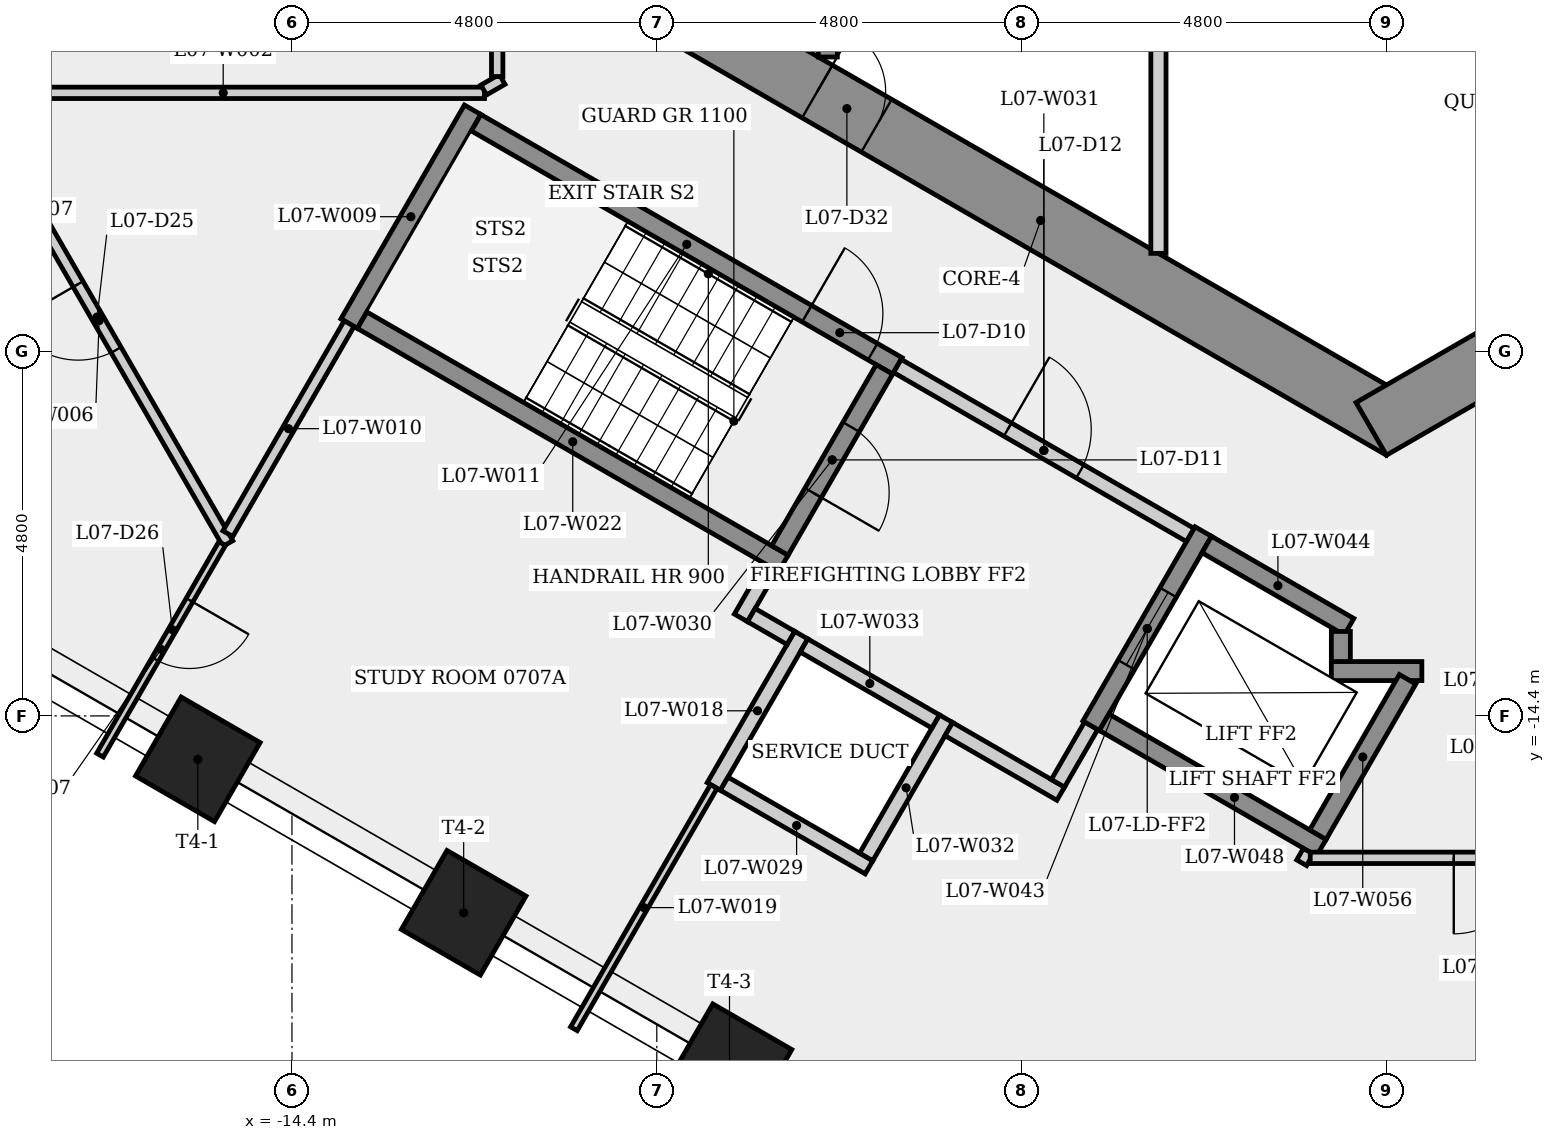
"""IFC4 building model, lengths in metres.
Left out: names, types, materials, properties, quantities, classifications, styles, units other than length and angle.
Written with IfcOpenShell. Run it as: python <this file> out.ifc"""

import sys

from ifc_helpers import new_model, si_unit, direction, frame, frame_2d, origin, origin_2d, place, context, subcontext, project, spatial, rectangle, extrude, element, fill, save


model = new_model("IFC4")
c1 = context("Model", 3, precision=1e-05, world=origin(), true_north=direction((0.0, 1.0)))
c2 = subcontext(c1, "Body", "Model", "MODEL_VIEW")
j1 = project(units=[si_unit("LENGTHUNIT", "METRE"), si_unit("PLANEANGLEUNIT", "RADIAN")], contexts=[c1])
p1 = place(None, origin())
s1 = spatial("IfcSite", under=j1, at=p1, CompositionType="ELEMENT")
p2 = place(p1, origin())
s2 = spatial("IfcBuilding", under=s1, at=p2, CompositionType="ELEMENT")
p3 = place(p2, frame((0.0, 0.0, 32.3)))
s3 = spatial("IfcBuildingStorey", under=s2, at=p3, CompositionType="ELEMENT", Elevation=32.3)
p4 = place(p3, frame((-9.3, -5.138, 0.0), z_axis=(0.0, 0.0, 1.0), x_axis=(0.866023993627, -0.500002442456, 0.0)))
e1 = element("IfcWall", 1, at=p4, inside=s3, PredefinedType="SHEAR", context=c2, shape_type="SweptSolid", body=[
    extrude(rectangle(XDim=10.97, YDim=0.8, at=frame_2d((5.485, 0.0))), origin(), (0.0, 0.0, 1.0), 3.4),
])
p5 = place(p4, frame((2.091, 0.0, 0.0)))
e2 = element("IfcOpeningElement", 2, at=p5, cuts=e1, PredefinedType="OPENING", context=c2, shape_type="SweptSolid", body=[
    extrude(rectangle(XDim=0.9, YDim=2.1, at=frame_2d((0.45, 1.05))), frame((0.0, 0.41, 0.0), z_axis=(0.0, -1.0, 0.0), x_axis=(1.0, 0.0, 0.0)), (0.0, 0.0, 1.0), 0.82),
])
p6 = place(p3, frame((-0.2, -10.623, 0.0), z_axis=(0.0, 0.0, 1.0), x_axis=(0.866023993627, 0.500002442456, 0.0)))
e3 = element("IfcWall", 3, at=p6, inside=s3, PredefinedType="SHEAR", context=c2, shape_type="SweptSolid", body=[
    extrude(rectangle(XDim=10.97, YDim=0.8, at=frame_2d((5.485, 0.0))), origin(), (0.0, 0.0, 1.0), 3.4),
])
p7 = place(p6, frame((4.914, 0.0, 0.0)))
e4 = element("IfcOpeningElement", 4, at=p7, cuts=e3, PredefinedType="OPENING", context=c2, shape_type="SweptSolid", body=[
    extrude(rectangle(XDim=0.9, YDim=2.1, at=frame_2d((0.45, 1.05))), frame((0.0, 0.41, 0.0), z_axis=(0.0, -1.0, 0.0), x_axis=(1.0, 0.0, 0.0)), (0.0, 0.0, 1.0), 0.82),
])
for number, where, z_axis, x_axis in (
    (5, (-15.639, -14.971, 0.0), (0.0, 0.0, 1.0), (-0.5, -0.866, 0.0)),
    (6, (-12.141, -16.99, 0.0), (0.0, 0.0, 1.0), (-0.5, -0.866, 0.0)),
    (7, (-8.644, -19.01, 0.0), (0.0, 0.0, 1.0), (-0.5, -0.866, 0.0)),
):
    element("IfcColumn", number, at=place(p3, frame(where, z_axis=z_axis, x_axis=x_axis)), inside=s3, PredefinedType="COLUMN", context=c2, shape_type="SweptSolid", body=[
        extrude(rectangle(XDim=1.2, YDim=1.2, at=origin_2d()), origin(), (0.0, 0.0, 1.0), 3.4),
    ])
p8 = place(p3, frame((-18.742, -6.202, 0.0), z_axis=(0.0, 0.0, 1.0), x_axis=(1.0, 0.0, 0.0)))
e8 = element("IfcWall", 8, at=p8, inside=s3, PredefinedType="PARTITIONING", context=c2, shape_type="SweptSolid", body=[
    extrude(rectangle(XDim=6.875, YDim=0.15, at=frame_2d((3.438, 0.0))), origin(), (0.0, 0.0, 1.0), 3.05),
])
p9 = place(p3, frame((-15.243, -12.132, 0.0), z_axis=(0.0, 0.0, 1.0), x_axis=(-0.500004319728, 0.866022909774, 0.0)))
e9 = element("IfcWall", 9, at=p9, inside=s3, PredefinedType="PARTITIONING", context=c2, shape_type="SweptSolid", body=[
    extrude(rectangle(XDim=6.773, YDim=0.15, at=frame_2d((3.386, 0.0))), origin(), (0.0, 0.0, 1.0), 3.05),
])
p10 = place(p9, frame((2.941, 0.0, 0.0)))
e10 = element("IfcOpeningElement", 10, at=p10, cuts=e9, PredefinedType="OPENING", context=c2, shape_type="SweptSolid", body=[
    extrude(rectangle(XDim=1.0, YDim=2.1, at=frame_2d((0.5, 1.05))), frame((0.0, 0.085, 0.0), z_axis=(0.0, -1.0, 0.0), x_axis=(1.0, 0.0, 0.0)), (0.0, 0.0, 1.0), 0.17),
])
p11 = place(p3, frame((-15.318, -12.132, 0.0), z_axis=(0.0, 0.0, 1.0), x_axis=(-0.500027048631, -0.866009786687, 0.0)))
e11 = element("IfcWall", 11, at=p11, inside=s3, PredefinedType="PARTITIONING", context=c2, shape_type="SweptSolid", body=[
    extrude(rectangle(XDim=3.215, YDim=0.1, at=frame_2d((1.607, 0.0))), origin(), (0.0, 0.0, 1.0), 3.05),
])
p12 = place(p11, frame((0.859, 0.0, 0.0)))
e12 = element("IfcOpeningElement", 12, at=p12, cuts=e11, PredefinedType="OPENING", context=c2, shape_type="SweptSolid", body=[
    extrude(rectangle(XDim=0.9, YDim=2.1, at=frame_2d((0.45, 1.05))), frame((0.0, 0.06, 0.0), z_axis=(0.0, -1.0, 0.0), x_axis=(1.0, 0.0, 0.0)), (0.0, 0.0, 1.0), 0.12),
])
p13 = place(p3, frame((-13.648, -9.239, 0.0), z_axis=(0.0, 0.0, 1.0), x_axis=(0.500017246033, 0.866015446554, 0.0)))
e13 = element("IfcWall", 13, at=p13, inside=s3, PredefinedType="SHEAR", context=c2, shape_type="SweptSolid", body=[
    extrude(rectangle(XDim=3.25, YDim=0.25, at=frame_2d((1.625, 0.0))), origin(), (0.0, 0.0, 1.0), 3.05),
])
p14 = place(p3, frame((-13.648, -9.239, 0.0), z_axis=(0.0, 0.0, 1.0), x_axis=(-0.50002266109, -0.866012320003, 0.0)))
e14 = element("IfcWall", 14, at=p14, inside=s3, PredefinedType="PARTITIONING", context=c2, shape_type="SweptSolid", body=[
    extrude(rectangle(XDim=3.191, YDim=0.15, at=frame_2d((1.596, 0.0))), origin(), (0.0, 0.0, 1.0), 3.05),
])
p15 = place(p3, frame((-11.977, -6.595, 0.0), z_axis=(0.0, 0.0, 1.0), x_axis=(0.866025499775, -0.499999833739, 0.0)))
e15 = element("IfcWall", 15, at=p15, inside=s3, PredefinedType="SHEAR", context=c2, shape_type="SweptSolid", body=[
    extrude(rectangle(XDim=6.4, YDim=0.25, at=frame_2d((3.2, 0.0))), origin(), (0.0, 0.0, 1.0), 3.05),
])
p16 = place(p15, frame((5.025, 0.0, 0.0)))
e16 = element("IfcOpeningElement", 16, at=p16, cuts=e15, PredefinedType="OPENING", context=c2, shape_type="SweptSolid", body=[
    extrude(rectangle(XDim=1.0, YDim=2.1, at=frame_2d((0.5, 1.05))), frame((0.0, 0.135, 0.0), z_axis=(0.0, -1.0, 0.0), x_axis=(1.0, 0.0, 0.0)), (0.0, 0.0, 1.0), 0.27),
])
p17 = place(p3, frame((-11.877, -6.164, 0.0), z_axis=(0.0, 0.0, 1.0), x_axis=(0.866083720475, 0.499898978922, 0.0)))
e17 = element("IfcWall", 17, at=p17, inside=s3, PredefinedType="PARTITIONING", context=c2, shape_type="SweptSolid", body=[
    extrude(rectangle(XDim=0.279, YDim=0.15, at=frame_2d((0.14, 0.0))), origin(), (0.0, 0.0, 1.0), 3.05),
])
p18 = place(p3, frame((-11.7, -5.987, 0.0), z_axis=(0.0, 0.0, 1.0), x_axis=(0.0, 1.0, 0.0)))
e18 = element("IfcWall", 18, at=p18, inside=s3, PredefinedType="PARTITIONING", context=c2, shape_type="SweptSolid", body=[
    extrude(rectangle(XDim=11.975, YDim=0.15, at=frame_2d((5.987, 0.0))), origin(), (0.0, 0.0, 1.0), 3.05),
])
p19 = place(p18, frame((5.487, 0.0, 0.0)))
e19 = element("IfcOpeningElement", 19, at=p19, cuts=e18, PredefinedType="OPENING", context=c2, shape_type="SweptSolid", body=[
    extrude(rectangle(XDim=1.0, YDim=2.1, at=frame_2d((0.5, 1.05))), frame((0.0, 0.085, 0.0), z_axis=(0.0, -1.0, 0.0), x_axis=(1.0, 0.0, 0.0)), (0.0, 0.0, 1.0), 0.17),
])
p20 = place(p3, frame((-8.85, -15.329, 0.0), z_axis=(0.0, 0.0, 1.0), x_axis=(0.500077740698, 0.865980515519, 0.0)))
e20 = element("IfcWall", 20, at=p20, inside=s3, PredefinedType="PLUMBINGWALL", context=c2, shape_type="SweptSolid", body=[
    extrude(rectangle(XDim=2.3, YDim=0.2, at=frame_2d((1.15, 0.0))), origin(), (0.0, 0.0, 1.0), 3.05),
])
p21 = place(p3, frame((-8.85, -15.329, 0.0), z_axis=(0.0, 0.0, 1.0), x_axis=(-0.499955964762, -0.866050826049, 0.0)))
e21 = element("IfcWall", 21, at=p21, inside=s3, PredefinedType="PARTITIONING", context=c2, shape_type="SweptSolid", body=[
    extrude(rectangle(XDim=3.68, YDim=0.1, at=frame_2d((1.84, 0.0))), origin(), (0.0, 0.0, 1.0), 3.05),
])
p22 = place(p3, frame((-8.493, -13.11, 0.0), z_axis=(0.0, 0.0, 1.0), x_axis=(0.500067724834, 0.865986299303, 0.0)))
e22 = element("IfcWall", 22, at=p22, inside=s3, PredefinedType="PARTITIONING", context=c2, shape_type="SweptSolid", body=[
    extrude(rectangle(XDim=0.775, YDim=0.2, at=frame_2d((0.388, 0.0))), origin(), (0.0, 0.0, 1.0), 3.05),
])
p23 = place(p3, frame((-7.935, -12.393, 0.0), z_axis=(0.0, 0.0, 1.0), x_axis=(-0.866025499775, 0.499999833739, 0.0)))
e23 = element("IfcWall", 23, at=p23, inside=s3, PredefinedType="SHEAR", context=c2, shape_type="SweptSolid", body=[
    extrude(rectangle(XDim=6.4, YDim=0.25, at=frame_2d((3.2, 0.0))), origin(), (0.0, 0.0, 1.0), 3.05),
])
p24 = place(p3, frame((-7.836, -13.373, 0.0), z_axis=(0.0, 0.0, 1.0), x_axis=(-0.866232998003, 0.499640263761, 0.0)))
e24 = element("IfcWall", 24, at=p24, inside=s3, PredefinedType="PARTITIONING", context=c2, shape_type="SweptSolid", body=[
    extrude(rectangle(XDim=0.6, YDim=0.2, at=frame_2d((0.3, 0.0))), origin(), (0.0, 0.0, 1.0), 3.05),
])
p25 = place(p3, frame((-7.35, -5.73, 0.0), z_axis=(0.0, 0.0, 1.0), x_axis=(0.0, 1.0, 0.0)))
e25 = element("IfcWall", 25, at=p25, inside=s3, PredefinedType="SHEAR", context=c2, shape_type="SweptSolid", body=[
    extrude(rectangle(XDim=4.055, YDim=0.25, at=frame_2d((2.028, 0.0))), origin(), (0.0, 0.0, 1.0), 3.05),
])
p26 = place(p3, frame((-6.808, -16.392, 0.0), z_axis=(0.0, 0.0, 1.0), x_axis=(-0.866008176907, 0.50002983664, 0.0)))
e26 = element("IfcWall", 26, at=p26, inside=s3, PredefinedType="PLUMBINGWALL", context=c2, shape_type="SweptSolid", body=[
    extrude(rectangle(XDim=2.2, YDim=0.2, at=frame_2d((1.1, 0.0))), origin(), (0.0, 0.0, 1.0), 3.05),
])
p27 = place(p3, frame((-6.605, -9.841, 0.0), z_axis=(0.0, 0.0, 1.0), x_axis=(-0.499996545922, -0.866027397988, 0.0)))
e27 = element("IfcWall", 27, at=p27, inside=s3, PredefinedType="SHEAR", context=c2, shape_type="SweptSolid", body=[
    extrude(rectangle(XDim=2.75, YDim=0.25, at=frame_2d((1.375, 0.0))), origin(), (0.0, 0.0, 1.0), 3.05),
])
p28 = place(p27, frame((0.875, 0.0, 0.0)))
e28 = element("IfcOpeningElement", 28, at=p28, cuts=e27, PredefinedType="OPENING", context=c2, shape_type="SweptSolid", body=[
    extrude(rectangle(XDim=1.0, YDim=2.1, at=frame_2d((0.5, 1.05))), frame((0.0, 0.135, 0.0), z_axis=(0.0, -1.0, 0.0), x_axis=(1.0, 0.0, 0.0)), (0.0, 0.0, 1.0), 0.27),
])
p29 = place(p3, frame((-6.435, -9.795, 0.0), z_axis=(0.0, 0.0, 1.0), x_axis=(0.866012907634, -0.500021643343, 0.0)))
e29 = element("IfcWall", 29, at=p29, inside=s3, PredefinedType="PARTITIONING", context=c2, shape_type="SweptSolid", body=[
    extrude(rectangle(XDim=4.45, YDim=0.2, at=frame_2d((2.225, 0.0))), origin(), (0.0, 0.0, 1.0), 3.05),
])
p30 = place(p29, frame((1.675, 0.0, 0.0)))
e30 = element("IfcOpeningElement", 30, at=p30, cuts=e29, PredefinedType="OPENING", context=c2, shape_type="SweptSolid", body=[
    extrude(rectangle(XDim=1.1, YDim=2.1, at=frame_2d((0.55, 1.05))), frame((0.0, 0.11, 0.0), z_axis=(0.0, -1.0, 0.0), x_axis=(1.0, 0.0, 0.0)), (0.0, 0.0, 1.0), 0.22),
])
p31 = place(p3, frame((-5.795, -14.437, 0.0), z_axis=(0.0, 0.0, 1.0), x_axis=(-0.500027713859, -0.866009402589, 0.0)))
e31 = element("IfcWall", 31, at=p31, inside=s3, PredefinedType="PLUMBINGWALL", context=c2, shape_type="SweptSolid", body=[
    extrude(rectangle(XDim=2.1, YDim=0.2, at=frame_2d((1.05, 0.0))), origin(), (0.0, 0.0, 1.0), 3.05),
])
p32 = place(p3, frame((-5.931, -14.473, 0.0), z_axis=(0.0, 0.0, 1.0), x_axis=(-0.866041268327, 0.499972520799, 0.0)))
e32 = element("IfcWall", 32, at=p32, inside=s3, PredefinedType="PLUMBINGWALL", context=c2, shape_type="SweptSolid", body=[
    extrude(rectangle(XDim=2.0, YDim=0.2, at=frame_2d((1.0, 0.0))), origin(), (0.0, 0.0, 1.0), 3.05),
])
p33 = place(p3, frame((-4.286, -15.423, 0.0), z_axis=(0.0, 0.0, 1.0), x_axis=(-0.866025371046, 0.500000056704, 0.0)))
e33 = element("IfcWall", 33, at=p33, inside=s3, PredefinedType="PARTITIONING", context=c2, shape_type="SweptSolid", body=[
    extrude(rectangle(XDim=1.7, YDim=0.2, at=frame_2d((0.85, 0.0))), origin(), (0.0, 0.0, 1.0), 3.05),
])
p34 = place(p3, frame((-3.885, -14.529, 0.0), z_axis=(0.0, 0.0, 1.0), x_axis=(-0.499859285417, -0.866106630146, 0.0)))
e34 = element("IfcWall", 34, at=p34, inside=s3, PredefinedType="PARTITIONING", context=c2, shape_type="SweptSolid", body=[
    extrude(rectangle(XDim=0.875, YDim=0.2, at=frame_2d((0.438, 0.0))), origin(), (0.0, 0.0, 1.0), 3.05),
])
p35 = place(p3, frame((-3.0, -5.275, 0.0), z_axis=(0.0, 0.0, 1.0), x_axis=(0.0, -1.0, 0.0)))
e35 = element("IfcWall", 35, at=p35, inside=s3, PredefinedType="PARTITIONING", context=c2, shape_type="SweptSolid", body=[
    extrude(rectangle(XDim=3.039, YDim=0.2, at=frame_2d((1.52, 0.0))), origin(), (0.0, 0.0, 1.0), 3.05),
])
p36 = place(p3, frame((-2.41, -11.974, 0.0), z_axis=(0.0, 0.0, 1.0), x_axis=(-0.500001826776, -0.866024349092, 0.0)))
e36 = element("IfcWall", 36, at=p36, inside=s3, PredefinedType="SHEAR", context=c2, shape_type="SweptSolid", body=[
    extrude(rectangle(XDim=2.95, YDim=0.25, at=frame_2d((1.475, 0.0))), origin(), (0.0, 0.0, 1.0), 3.05),
])
p37 = place(p36, frame((0.925, 0.0, 0.0)))
e37 = element("IfcOpeningElement", 37, at=p37, cuts=e36, PredefinedType="OPENING", context=c2, shape_type="SweptSolid", body=[
    extrude(rectangle(XDim=1.1, YDim=2.1, at=frame_2d((0.55, 1.05))), frame((0.0, 0.135, 0.0), z_axis=(0.0, -1.0, 0.0), x_axis=(1.0, 0.0, 0.0)), (0.0, 0.0, 1.0), 0.27),
])
p38 = place(p3, frame((-2.364, -12.145, 0.0), z_axis=(0.0, 0.0, 1.0), x_axis=(0.86603892542, -0.499976579108, 0.0)))
e38 = element("IfcWall", 38, at=p38, inside=s3, PredefinedType="SHEAR", context=c2, shape_type="SweptSolid", body=[
    extrude(rectangle(XDim=2.162, YDim=0.25, at=frame_2d((1.081, 0.0))), origin(), (0.0, 0.0, 1.0), 3.05),
])
p39 = place(p3, frame((-1.115, -16.332, 0.0), z_axis=(0.0, 0.0, 1.0), x_axis=(0.499403939877, 0.866369265865, 0.0)))
e39 = element("IfcWall", 39, at=p39, inside=s3, PredefinedType="PARTITIONING", context=c2, shape_type="SweptSolid", body=[
    extrude(rectangle(XDim=0.177, YDim=0.15, at=frame_2d((0.088, 0.0))), origin(), (0.0, 0.0, 1.0), 3.05),
])
p40 = place(p3, frame((-0.856, -16.133, 0.0), z_axis=(0.0, 0.0, 1.0), x_axis=(-0.866021716278, 0.500006386895, 0.0)))
e40 = element("IfcWall", 40, at=p40, inside=s3, PredefinedType="SHEAR", context=c2, shape_type="SweptSolid", body=[
    extrude(rectangle(XDim=3.3, YDim=0.25, at=frame_2d((1.65, 0.0))), origin(), (0.0, 0.0, 1.0), 3.05),
])
p41 = place(p3, frame((-0.725, -13.81, 0.0), z_axis=(0.0, 0.0, 1.0), x_axis=(1.0, 0.0, 0.0)))
e41 = element("IfcWall", 41, at=p41, inside=s3, PredefinedType="SHEAR", context=c2, shape_type="SweptSolid", body=[
    extrude(rectangle(XDim=1.191, YDim=0.25, at=frame_2d((0.595, 0.0))), origin(), (0.0, 0.0, 1.0), 3.05),
])
p42 = place(p3, frame((-0.6, -13.289, 0.0), z_axis=(0.0, 0.0, 1.0), x_axis=(0.0, -1.0, 0.0)))
e42 = element("IfcWall", 42, at=p42, inside=s3, PredefinedType="SHEAR", context=c2, shape_type="SweptSolid", body=[
    extrude(rectangle(XDim=0.396, YDim=0.25, at=frame_2d((0.198, 0.0))), origin(), (0.0, 0.0, 1.0), 3.4),
])
p43 = place(p3, frame((0.278, -13.918, 0.0), z_axis=(0.0, 0.0, 1.0), x_axis=(-0.49998806882, -0.866032292145, 0.0)))
e43 = element("IfcWall", 43, at=p43, inside=s3, PredefinedType="SHEAR", context=c2, shape_type="SweptSolid", body=[
    extrude(rectangle(XDim=2.36, YDim=0.25, at=frame_2d((1.18, 0.0))), origin(), (0.0, 0.0, 1.0), 3.4),
])
p44 = place(p3, frame((3.774, -16.267, 0.0), z_axis=(0.0, 0.0, 1.0), x_axis=(-1.0, 0.0, 0.0)))
e44 = element("IfcWall", 44, at=p44, inside=s3, PredefinedType="PARTITIONING", context=c2, shape_type="SweptSolid", body=[
    extrude(rectangle(XDim=4.778, YDim=0.15, at=frame_2d((2.389, 0.0))), origin(), (0.0, 0.0, 1.0), 3.05),
])
p45 = place(p44, frame((1.889, 0.0, 0.0)))
e45 = element("IfcOpeningElement", 45, at=p45, cuts=e44, PredefinedType="OPENING", context=c2, shape_type="SweptSolid", body=[
    extrude(rectangle(XDim=1.0, YDim=2.1, at=frame_2d((0.5, 1.05))), frame((0.0, 0.085, 0.0), z_axis=(0.0, -1.0, 0.0), x_axis=(1.0, 0.0, 0.0)), (0.0, 0.0, 1.0), 0.17),
])
p46 = place(p16, origin())
e46 = element("IfcDoor", 46, at=p46, inside=s3, OperationType="SINGLE_SWING_LEFT", PredefinedType="DOOR", context=c2, shape_type="SweptSolid", body=[
    extrude(rectangle(XDim=1.0, YDim=2.1, at=frame_2d((0.5, 1.05))), frame((0.0, 0.025, 0.0), z_axis=(0.0, -1.0, 0.0), x_axis=(1.0, 0.0, 0.0)), (0.0, 0.0, 1.0), 0.05),
])
fill(e16, e46)
p47 = place(p28, origin())
e47 = element("IfcDoor", 47, at=p47, inside=s3, OperationType="SINGLE_SWING_RIGHT", PredefinedType="DOOR", context=c2, shape_type="SweptSolid", body=[
    extrude(rectangle(XDim=1.0, YDim=2.1, at=frame_2d((0.5, 1.05))), frame((0.0, 0.025, 0.0), z_axis=(0.0, -1.0, 0.0), x_axis=(1.0, 0.0, 0.0)), (0.0, 0.0, 1.0), 0.05),
])
fill(e28, e47)
p48 = place(p30, origin())
e48 = element("IfcDoor", 48, at=p48, inside=s3, OperationType="SINGLE_SWING_LEFT", PredefinedType="DOOR", context=c2, shape_type="SweptSolid", body=[
    extrude(rectangle(XDim=1.1, YDim=2.1, at=frame_2d((0.55, 1.05))), frame((0.0, 0.025, 0.0), z_axis=(0.0, -1.0, 0.0), x_axis=(1.0, 0.0, 0.0)), (0.0, 0.0, 1.0), 0.05),
])
fill(e30, e48)
p49 = place(p37, origin())
e49 = element("IfcDoor", 49, at=p49, inside=s3, OperationType="SLIDING_TO_LEFT", PredefinedType="DOOR", context=c2, shape_type="SweptSolid", body=[
    extrude(rectangle(XDim=1.1, YDim=2.1, at=frame_2d((0.55, 1.05))), frame((0.0, 0.025, 0.0), z_axis=(0.0, -1.0, 0.0), x_axis=(1.0, 0.0, 0.0)), (0.0, 0.0, 1.0), 0.05),
])
fill(e37, e49)
p50 = place(p10, origin())
e50 = element("IfcDoor", 50, at=p50, inside=s3, OperationType="SINGLE_SWING_RIGHT", PredefinedType="DOOR", context=c2, shape_type="SweptSolid", body=[
    extrude(rectangle(XDim=1.0, YDim=2.1, at=frame_2d((0.5, 1.05))), frame((0.0, 0.025, 0.0), z_axis=(0.0, -1.0, 0.0), x_axis=(1.0, 0.0, 0.0)), (0.0, 0.0, 1.0), 0.05),
])
fill(e10, e50)
p51 = place(p12, origin())
e51 = element("IfcDoor", 51, at=p51, inside=s3, OperationType="SINGLE_SWING_LEFT", PredefinedType="DOOR", context=c2, shape_type="SweptSolid", body=[
    extrude(rectangle(XDim=0.9, YDim=2.1, at=frame_2d((0.45, 1.05))), frame((0.0, 0.025, 0.0), z_axis=(0.0, -1.0, 0.0), x_axis=(1.0, 0.0, 0.0)), (0.0, 0.0, 1.0), 0.05),
])
fill(e12, e51)
p52 = place(p45, origin())
e52 = element("IfcDoor", 52, at=p52, inside=s3, OperationType="SINGLE_SWING_RIGHT", PredefinedType="DOOR", context=c2, shape_type="SweptSolid", body=[
    extrude(rectangle(XDim=1.0, YDim=2.1, at=frame_2d((0.5, 1.05))), frame((0.0, 0.025, 0.0), z_axis=(0.0, -1.0, 0.0), x_axis=(1.0, 0.0, 0.0)), (0.0, 0.0, 1.0), 0.05),
])
fill(e45, e52)
p53 = place(p5, origin())
e53 = element("IfcDoor", 53, at=p53, inside=s3, OperationType="SINGLE_SWING_LEFT", PredefinedType="DOOR", context=c2, shape_type="SweptSolid", body=[
    extrude(rectangle(XDim=0.9, YDim=2.1, at=frame_2d((0.45, 1.05))), frame((0.0, 0.025, 0.0), z_axis=(0.0, -1.0, 0.0), x_axis=(1.0, 0.0, 0.0)), (0.0, 0.0, 1.0), 0.05),
])
fill(e2, e53)
save(model, sys.argv[1])
